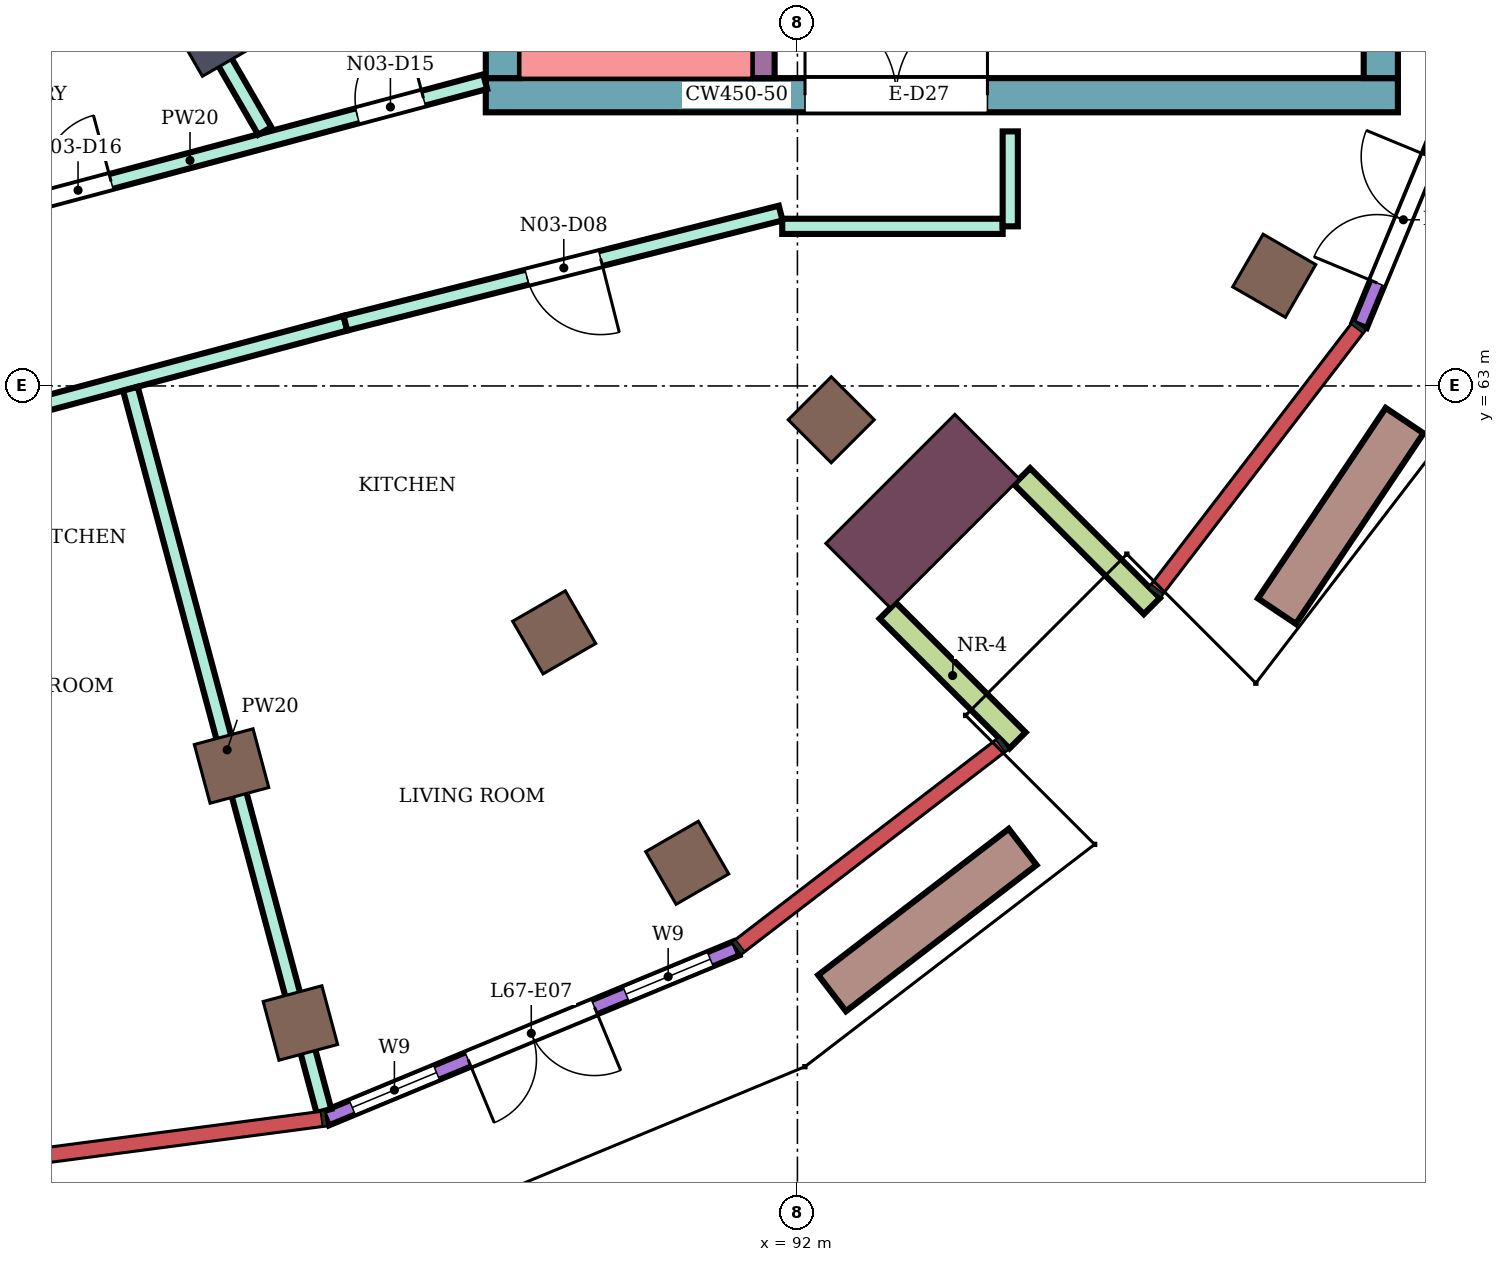
"""IFC4 building model, lengths in metres.
Left out: names, types, materials, properties, quantities, classifications, styles, units other than length and angle.
Written with IfcOpenShell. Run it as: python <this file> out.ifc"""

import sys

from ifc_helpers import new_model, si_unit, direction, frame, frame_2d, origin, origin_2d, place, context, subcontext, project, spatial, rectangle, extrude, element, fill, save


model = new_model("IFC4")
c1 = context("Model", 3, precision=1e-05, world=origin(), true_north=direction((0.0, 1.0)))
c2 = subcontext(c1, "Body", "Model", "MODEL_VIEW")
j1 = project(units=[si_unit("LENGTHUNIT", "METRE"), si_unit("PLANEANGLEUNIT", "RADIAN")], contexts=[c1])
p1 = place(None, origin())
s1 = spatial("IfcSite", under=j1, at=p1, CompositionType="ELEMENT")
p2 = place(p1, origin())
s2 = spatial("IfcBuilding", under=s1, at=p2, CompositionType="ELEMENT")
p3 = place(p2, frame((0.0, 0.0, 292.5)))
s3 = spatial("IfcBuildingStorey", under=s2, at=p3, CompositionType="ELEMENT", Elevation=292.5)
for number, where, z_axis, x_axis in (
    (1, (85.461, 54.619, 0.0), (0.0, 0.0, 1.0), (0.259, -0.966, 0.0)),
    (2, (90.55, 56.727, 0.0), (0.0, 0.0, 1.0), (0.5, -0.866, 0.0)),
    (3, (98.273, 64.45, 0.0), (0.0, 0.0, 1.0), (0.866, -0.5, 0.0)),
    (4, (84.555, 58.0, 0.0), (0.0, 0.0, 1.0), (0.259, -0.966, 0.0)),
    (5, (88.8, 59.758, 0.0), (0.0, 0.0, 1.0), (0.5, -0.866, 0.0)),
    (6, (92.445, 62.555, 0.0), (0.0, 0.0, 1.0), (0.707, -0.707, 0.0)),
):
    element("IfcColumn", number, at=place(p3, frame(where, z_axis=z_axis, x_axis=x_axis)), inside=s3, PredefinedType="COLUMN", context=c2, shape_type="SweptSolid", body=[
        extrude(rectangle(XDim=0.8, YDim=0.8, at=origin_2d()), origin(), (0.0, 0.0, 1.0), 4.2),
    ])
p4 = place(p3, frame((84.3, 67.552, 0.0), z_axis=(0.0, 0.0, 1.0), x_axis=(0.5, -0.866025403784, 0.0)))
e7 = element("IfcColumn", 7, at=p4, inside=s3, PredefinedType="COLUMN", context=c2, shape_type="SweptSolid", body=[
    extrude(rectangle(XDim=0.7, YDim=0.7, at=origin_2d()), origin(), (0.0, 0.0, 1.0), 4.2),
])
p5 = place(p3, frame((93.647, 61.353, 0.0), z_axis=(0.0, 0.0, 1.0), x_axis=(0.707106781187, -0.707106781187, 0.0)))
e8 = element("IfcColumn", 8, at=p5, inside=s3, PredefinedType="COLUMN", context=c2, shape_type="SweptSolid", body=[
    extrude(rectangle(XDim=1.2, YDim=2.4, at=origin_2d()), origin(), (0.0, 0.0, 1.0), 4.2),
])
p6 = place(p3, frame((87.9, 66.825, 0.0), z_axis=(0.0, 0.0, 1.0), x_axis=(1.0, 0.0, 0.0)))
e9 = element("IfcWall", 9, at=p6, inside=s3, PredefinedType="SHEAR", context=c2, shape_type="SweptSolid", body=[
    extrude(rectangle(XDim=12.0, YDim=0.45, at=frame_2d((6.0, 0.0))), origin(), (0.0, 0.0, 1.0), 3.88),
])
p7 = place(p6, frame((4.2, 0.0, 0.0)))
e10 = element("IfcOpeningElement", 10, at=p7, cuts=e9, PredefinedType="OPENING", context=c2, shape_type="SweptSolid", body=[
    extrude(rectangle(XDim=2.4, YDim=2.4, at=frame_2d((1.2, 1.2))), frame((0.0, 0.235, 0.0), z_axis=(0.0, -1.0, 0.0), x_axis=(1.0, 0.0, 0.0)), (0.0, 0.0, 1.0), 0.47),
])
p8 = place(p3, frame((88.125, 67.05, 0.0), z_axis=(0.0, 0.0, 1.0), x_axis=(0.0, 1.0, 0.0)))
e11 = element("IfcWall", 11, at=p8, inside=s3, PredefinedType="SHEAR", context=c2, shape_type="SweptSolid", body=[
    extrude(rectangle(XDim=7.95, YDim=0.45, at=frame_2d((3.975, 0.0))), origin(), (0.0, 0.0, 1.0), 3.88),
])
p9 = place(p3, frame((99.675, 67.05, 0.0), z_axis=(0.0, 0.0, 1.0), x_axis=(0.0, 1.0, 0.0)))
e12 = element("IfcWall", 12, at=p9, inside=s3, PredefinedType="SHEAR", context=c2, shape_type="SweptSolid", body=[
    extrude(rectangle(XDim=3.7, YDim=0.45, at=frame_2d((1.85, 0.0))), origin(), (0.0, 0.0, 1.0), 3.88),
])
p10 = place(p3, frame((91.55, 67.05, 0.0), z_axis=(0.0, 0.0, 1.0), x_axis=(0.0, 1.0, 0.0)))
e13 = element("IfcWall", 13, at=p10, inside=s3, PredefinedType="SHEAR", context=c2, shape_type="SweptSolid", body=[
    extrude(rectangle(XDim=7.95, YDim=0.3, at=frame_2d((3.975, 0.0))), origin(), (0.0, 0.0, 1.0), 3.88),
])
p11 = place(p10, frame((0.6, 0.0, 0.0)))
e14 = element("IfcOpeningElement", 14, at=p11, cuts=e13, PredefinedType="OPENING", context=c2, shape_type="SweptSolid", body=[
    extrude(rectangle(XDim=0.9, YDim=2.1, at=frame_2d((0.45, 1.05))), frame((0.0, 0.16, 0.0), z_axis=(0.0, -1.0, 0.0), x_axis=(1.0, 0.0, 0.0)), (0.0, 0.0, 1.0), 0.32),
])
p12 = place(p3, frame((85.797, 53.364, 0.0), z_axis=(0.0, 0.0, 1.0), x_axis=(0.923869250418, 0.382708254591, 0.0)))
e15 = element("IfcWall", 15, at=p12, inside=s3, PredefinedType="NOTDEFINED", context=c2, shape_type="SweptSolid", body=[
    extrude(rectangle(XDim=5.847, YDim=0.2, at=frame_2d((2.924, 0.0))), origin(), (0.0, 0.0, 1.0), 4.2),
])
p13 = place(p12, frame((0.375, 0.0, 0.9)))
e16 = element("IfcOpeningElement", 16, at=p13, cuts=e15, PredefinedType="OPENING", context=c2, shape_type="SweptSolid", body=[
    extrude(rectangle(XDim=1.2, YDim=2.7, at=frame_2d((0.6, 1.35))), frame((0.0, 0.11, 0.0), z_axis=(0.0, -1.0, 0.0), x_axis=(1.0, 0.0, 0.0)), (0.0, 0.0, 1.0), 0.22),
])
p14 = place(p12, frame((2.024, 0.0, 0.0)))
e17 = element("IfcOpeningElement", 17, at=p14, cuts=e15, PredefinedType="OPENING", context=c2, shape_type="SweptSolid", body=[
    extrude(rectangle(XDim=1.8, YDim=2.7, at=frame_2d((0.9, 1.35))), frame((0.0, 0.11, 0.0), z_axis=(0.0, -1.0, 0.0), x_axis=(1.0, 0.0, 0.0)), (0.0, 0.0, 1.0), 0.22),
])
p15 = place(p12, frame((4.273, 0.0, 0.9)))
e18 = element("IfcOpeningElement", 18, at=p15, cuts=e15, PredefinedType="OPENING", context=c2, shape_type="SweptSolid", body=[
    extrude(rectangle(XDim=1.2, YDim=2.7, at=frame_2d((0.6, 1.35))), frame((0.0, 0.11, 0.0), z_axis=(0.0, -1.0, 0.0), x_axis=(1.0, 0.0, 0.0)), (0.0, 0.0, 1.0), 0.22),
])
p16 = place(p3, frame((99.398, 63.801, 0.0), z_axis=(0.0, 0.0, 1.0), x_axis=(0.382708254591, 0.923869250418, 0.0)))
e19 = element("IfcWall", 19, at=p16, inside=s3, PredefinedType="NOTDEFINED", context=c2, shape_type="SweptSolid", body=[
    extrude(rectangle(XDim=5.847, YDim=0.2, at=frame_2d((2.924, 0.0))), origin(), (0.0, 0.0, 1.0), 4.2),
])
p17 = place(p16, frame((0.6, 0.0, 0.0)))
e20 = element("IfcOpeningElement", 20, at=p17, cuts=e19, PredefinedType="OPENING", context=c2, shape_type="SweptSolid", body=[
    extrude(rectangle(XDim=1.8, YDim=2.7, at=frame_2d((0.9, 1.35))), frame((0.0, 0.11, 0.0), z_axis=(0.0, -1.0, 0.0), x_axis=(1.0, 0.0, 0.0)), (0.0, 0.0, 1.0), 0.22),
])
p18 = place(p16, frame((2.85, 0.0, 0.9)))
e21 = element("IfcOpeningElement", 21, at=p18, cuts=e19, PredefinedType="OPENING", context=c2, shape_type="SweptSolid", body=[
    extrude(rectangle(XDim=1.2, YDim=2.7, at=frame_2d((0.6, 1.35))), frame((0.0, 0.11, 0.0), z_axis=(0.0, -1.0, 0.0), x_axis=(1.0, 0.0, 0.0)), (0.0, 0.0, 1.0), 0.22),
])
for number, where, z_axis, x_axis in (
    (22, (93.188, 60.045, 0.0), (0.0, 0.0, 1.0), (0.707, -0.707, 0.0)),
    (23, (94.955, 61.812, 0.0), (0.0, 0.0, 1.0), (0.707, -0.707, 0.0)),
):
    element("IfcWall", number, at=place(p3, frame(where, z_axis=z_axis, x_axis=x_axis)), inside=s3, PredefinedType="NOTDEFINED", context=c2, shape_type="SweptSolid", body=[
        extrude(rectangle(XDim=2.416, YDim=0.3, at=frame_2d((1.208, 0.0))), origin(), (0.0, 0.0, 1.0), 4.2),
    ])
p19 = place(p3, frame((80.0, 67.396, 0.0), z_axis=(0.0, 0.0, 1.0), x_axis=(0.965933654434, 0.258789828301, 0.0)))
e24 = element("IfcWall", 24, at=p19, inside=s3, PredefinedType="NOTDEFINED", context=c2, shape_type="SweptSolid", body=[
    extrude(rectangle(XDim=3.936, YDim=0.2, at=frame_2d((1.968, 0.0))), origin(), (0.0, 0.0, 1.0), 4.2),
])
p20 = place(p19, frame((0.468, 0.0, 0.9)))
e25 = element("IfcOpeningElement", 25, at=p20, cuts=e24, PredefinedType="OPENING", context=c2, shape_type="SweptSolid", body=[
    extrude(rectangle(XDim=3.0, YDim=2.3, at=frame_2d((1.5, 1.15))), frame((0.0, 0.11, 0.0), z_axis=(0.0, -1.0, 0.0), x_axis=(1.0, 0.0, 0.0)), (0.0, 0.0, 1.0), 0.22),
])
p21 = place(p3, frame((92.456, 55.012, 0.0), z_axis=(0.0, 0.0, 1.0), x_axis=(0.793350112932, 0.608765634962, 0.0)))
e26 = element("IfcWall", 26, at=p21, inside=s3, PredefinedType="USERDEFINED", context=c2, shape_type="SweptSolid", body=[
    extrude(rectangle(XDim=3.16, YDim=0.6, at=frame_2d((1.58, 0.0))), origin(), (0.0, 0.0, 1.0), 0.6),
])
p22 = place(p3, frame((98.308, 60.037, 0.0), z_axis=(0.0, 0.0, 1.0), x_axis=(0.556696289076, 0.830716101763, 0.0)))
e27 = element("IfcWall", 27, at=p22, inside=s3, PredefinedType="USERDEFINED", context=c2, shape_type="SweptSolid", body=[
    extrude(rectangle(XDim=3.018, YDim=0.6, at=frame_2d((1.509, 0.0))), origin(), (0.0, 0.0, 1.0), 0.6),
])
p23 = place(p3, frame((80.125, 64.932, 0.0), z_axis=(0.0, 0.0, 1.0), x_axis=(0.966236955806, 0.257655089674, 0.0)))
e28 = element("IfcWall", 28, at=p23, inside=s3, PredefinedType="PARTITIONING", context=c2, shape_type="SweptSolid", body=[
    extrude(rectangle(XDim=8.039, YDim=0.2, at=frame_2d((4.02, 0.0))), origin(), (0.0, 0.0, 1.0), 3.75),
])
p24 = place(p23, frame((6.298, 0.0, 0.0)))
e29 = element("IfcOpeningElement", 29, at=p24, cuts=e28, PredefinedType="OPENING", context=c2, shape_type="SweptSolid", body=[
    extrude(rectangle(XDim=0.9, YDim=2.1, at=frame_2d((0.45, 1.05))), frame((0.0, 0.11, 0.0), z_axis=(0.0, -1.0, 0.0), x_axis=(1.0, 0.0, 0.0)), (0.0, 0.0, 1.0), 0.22),
])
p25 = place(p23, frame((2.045, 0.0, 0.0)))
e30 = element("IfcOpeningElement", 30, at=p25, cuts=e28, PredefinedType="OPENING", context=c2, shape_type="SweptSolid", body=[
    extrude(rectangle(XDim=0.9, YDim=2.1, at=frame_2d((0.45, 1.05))), frame((0.0, 0.11, 0.0), z_axis=(0.0, -1.0, 0.0), x_axis=(1.0, 0.0, 0.0)), (0.0, 0.0, 1.0), 0.22),
])
p26 = place(p3, frame((80.048, 62.217, 0.0), z_axis=(0.0, 0.0, 1.0), x_axis=(0.965937709386, 0.258774692708, 0.0)))
e31 = element("IfcWall", 31, at=p26, inside=s3, PredefinedType="PARTITIONING", context=c2, shape_type="SweptSolid", body=[
    extrude(rectangle(XDim=6.216, YDim=0.2, at=frame_2d((3.108, 0.0))), origin(), (0.0, 0.0, 1.0), 3.75),
])
p27 = place(p26, frame((0.5, 0.0, 0.0)))
e32 = element("IfcOpeningElement", 32, at=p27, cuts=e31, PredefinedType="OPENING", context=c2, shape_type="SweptSolid", body=[
    extrude(rectangle(XDim=1.0, YDim=2.1, at=frame_2d((0.5, 1.05))), frame((0.0, 0.11, 0.0), z_axis=(0.0, -1.0, 0.0), x_axis=(1.0, 0.0, 0.0)), (0.0, 0.0, 1.0), 0.22),
])
p28 = place(p3, frame((83.225, 62.963, 0.0), z_axis=(0.0, 0.0, 1.0), x_axis=(0.258782398991, -0.96593564484, 0.0)))
e33 = element("IfcWall", 33, at=p28, inside=s3, PredefinedType="PARTITIONING", context=c2, shape_type="SweptSolid", body=[
    extrude(rectangle(XDim=9.837, YDim=0.2, at=frame_2d((4.918, 0.0))), origin(), (0.0, 0.0, 1.0), 3.75),
])
p29 = place(p3, frame((83.85, 68.333, 0.0), z_axis=(0.0, 0.0, 1.0), x_axis=(0.500080019051, -0.865979199835, 0.0)))
e34 = element("IfcWall", 34, at=p29, inside=s3, PredefinedType="PARTITIONING", context=c2, shape_type="SweptSolid", body=[
    extrude(rectangle(XDim=2.285, YDim=0.2, at=frame_2d((1.143, 0.0))), origin(), (0.0, 0.0, 1.0), 3.75),
])
p30 = place(p3, frame((86.053, 63.826, 0.0), z_axis=(0.0, 0.0, 1.0), x_axis=(0.969480070232, 0.245170131586, 0.0)))
e35 = element("IfcWall", 35, at=p30, inside=s3, PredefinedType="PARTITIONING", context=c2, shape_type="SweptSolid", body=[
    extrude(rectangle(XDim=5.907, YDim=0.2, at=frame_2d((2.954, 0.0))), origin(), (0.0, 0.0, 1.0), 3.75),
])
p31 = place(p30, frame((2.464, 0.0, 0.0)))
e36 = element("IfcOpeningElement", 36, at=p31, cuts=e35, PredefinedType="OPENING", context=c2, shape_type="SweptSolid", body=[
    extrude(rectangle(XDim=1.0, YDim=2.1, at=frame_2d((0.5, 1.05))), frame((0.0, 0.11, 0.0), z_axis=(0.0, -1.0, 0.0), x_axis=(1.0, 0.0, 0.0)), (0.0, 0.0, 1.0), 0.22),
])
p32 = place(p3, frame((91.8, 65.1, 0.0), z_axis=(0.0, 0.0, 1.0), x_axis=(1.0, 0.0, 0.0)))
e37 = element("IfcWall", 37, at=p32, inside=s3, PredefinedType="PARTITIONING", context=c2, shape_type="SweptSolid", body=[
    extrude(rectangle(XDim=2.9, YDim=0.2, at=frame_2d((1.45, 0.0))), origin(), (0.0, 0.0, 1.0), 3.75),
])
p33 = place(p3, frame((94.8, 65.1, 0.0), z_axis=(0.0, 0.0, 1.0), x_axis=(0.0, 1.0, 0.0)))
e38 = element("IfcWall", 38, at=p33, inside=s3, PredefinedType="PARTITIONING", context=c2, shape_type="SweptSolid", body=[
    extrude(rectangle(XDim=1.249, YDim=0.2, at=frame_2d((0.625, 0.0))), origin(), (0.0, 0.0, 1.0), 3.75),
])
p34 = place(p13, origin())
e39 = element("IfcWindow", 39, at=p34, inside=s3, PartitioningType="SINGLE_PANEL", PredefinedType="WINDOW", context=c2, shape_type="SweptSolid", body=[
    extrude(rectangle(XDim=1.2, YDim=2.7, at=frame_2d((0.6, 1.35))), frame((0.0, 0.03, 0.0), z_axis=(0.0, -1.0, 0.0), x_axis=(1.0, 0.0, 0.0)), (0.0, 0.0, 1.0), 0.06),
])
fill(e16, e39)
p35 = place(p14, frame((1.8, 0.0, 0.0), z_axis=(0.0, 0.0, 1.0), x_axis=(-1.0, 0.0, 0.0)))
e40 = element("IfcDoor", 40, at=p35, inside=s3, OperationType="DOUBLE_DOOR_SINGLE_SWING", PredefinedType="DOOR", context=c2, shape_type="SweptSolid", body=[
    extrude(rectangle(XDim=1.8, YDim=2.7, at=frame_2d((0.9, 1.35))), frame((0.0, 0.025, 0.0), z_axis=(0.0, -1.0, 0.0), x_axis=(1.0, 0.0, 0.0)), (0.0, 0.0, 1.0), 0.05),
])
fill(e17, e40)
p36 = place(p15, origin())
e41 = element("IfcWindow", 41, at=p36, inside=s3, PartitioningType="SINGLE_PANEL", PredefinedType="WINDOW", context=c2, shape_type="SweptSolid", body=[
    extrude(rectangle(XDim=1.2, YDim=2.7, at=frame_2d((0.6, 1.35))), frame((0.0, 0.03, 0.0), z_axis=(0.0, -1.0, 0.0), x_axis=(1.0, 0.0, 0.0)), (0.0, 0.0, 1.0), 0.06),
])
fill(e18, e41)
p37 = place(p17, origin())
e42 = element("IfcDoor", 42, at=p37, inside=s3, OperationType="DOUBLE_DOOR_SINGLE_SWING", PredefinedType="DOOR", context=c2, shape_type="SweptSolid", body=[
    extrude(rectangle(XDim=1.8, YDim=2.7, at=frame_2d((0.9, 1.35))), frame((0.0, 0.025, 0.0), z_axis=(0.0, -1.0, 0.0), x_axis=(1.0, 0.0, 0.0)), (0.0, 0.0, 1.0), 0.05),
])
fill(e20, e42)
p38 = place(p31, frame((1.0, 0.0, 0.0), z_axis=(0.0, 0.0, 1.0), x_axis=(-1.0, 0.0, 0.0)))
e43 = element("IfcDoor", 43, at=p38, inside=s3, OperationType="SINGLE_SWING_LEFT", PredefinedType="DOOR", context=c2, shape_type="SweptSolid", body=[
    extrude(rectangle(XDim=1.0, YDim=2.1, at=frame_2d((0.5, 1.05))), frame((0.0, 0.025, 0.0), z_axis=(0.0, -1.0, 0.0), x_axis=(1.0, 0.0, 0.0)), (0.0, 0.0, 1.0), 0.05),
])
fill(e36, e43)
p39 = place(p24, origin())
e44 = element("IfcDoor", 44, at=p39, inside=s3, OperationType="SINGLE_SWING_RIGHT", PredefinedType="DOOR", context=c2, shape_type="SweptSolid", body=[
    extrude(rectangle(XDim=0.9, YDim=2.1, at=frame_2d((0.45, 1.05))), frame((0.0, 0.025, 0.0), z_axis=(0.0, -1.0, 0.0), x_axis=(1.0, 0.0, 0.0)), (0.0, 0.0, 1.0), 0.05),
])
fill(e29, e44)
p40 = place(p25, origin())
e45 = element("IfcDoor", 45, at=p40, inside=s3, OperationType="SINGLE_SWING_RIGHT", PredefinedType="DOOR", context=c2, shape_type="SweptSolid", body=[
    extrude(rectangle(XDim=0.9, YDim=2.1, at=frame_2d((0.45, 1.05))), frame((0.0, 0.025, 0.0), z_axis=(0.0, -1.0, 0.0), x_axis=(1.0, 0.0, 0.0)), (0.0, 0.0, 1.0), 0.05),
])
fill(e30, e45)
p41 = place(p7, origin())
e46 = element("IfcDoor", 46, at=p41, inside=s3, OperationType="DOUBLE_DOOR_SINGLE_SWING", PredefinedType="DOOR", context=c2, shape_type="SweptSolid", body=[
    extrude(rectangle(XDim=2.4, YDim=2.4, at=frame_2d((1.2, 1.2))), frame((0.0, 0.025, 0.0), z_axis=(0.0, -1.0, 0.0), x_axis=(1.0, 0.0, 0.0)), (0.0, 0.0, 1.0), 0.05),
])
fill(e10, e46)
save(model, sys.argv[1])
